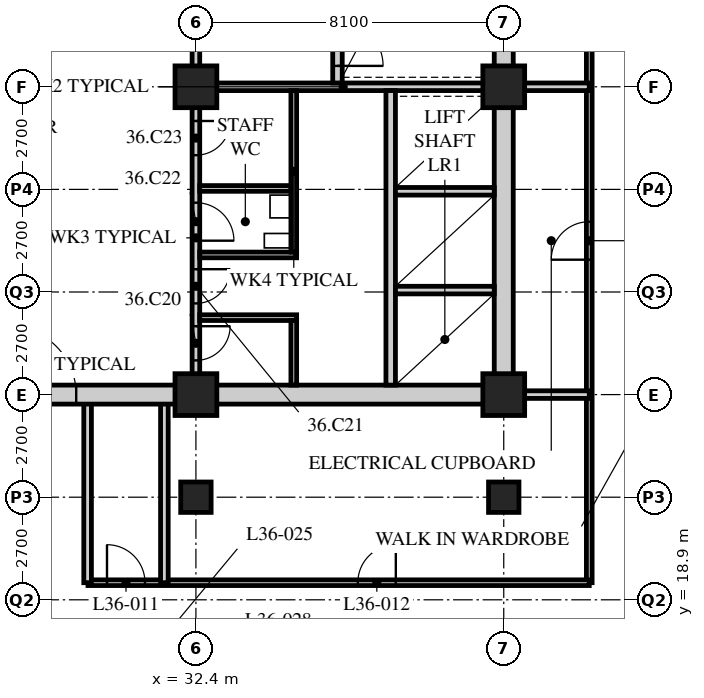
"""IFC4 building model, lengths in metres.
Left out: names, types, materials, properties, quantities, classifications, styles, units other than length and angle.
Written with IfcOpenShell. Run it as: python <this file> out.ifc"""

import sys

from ifc_helpers import new_model, si_unit, direction, frame, frame_2d, origin, origin_2d, place, context, subcontext, project, spatial, rectangle, hollow_rectangle, extrude, element, fill, save


model = new_model("IFC4")
c1 = context("Model", 3, precision=1e-05, world=origin(), true_north=direction((0.0, 1.0)))
c2 = subcontext(c1, "Body", "Model", "MODEL_VIEW")
j1 = project(units=[si_unit("LENGTHUNIT", "METRE"), si_unit("PLANEANGLEUNIT", "RADIAN")], contexts=[c1])
p1 = place(None, origin())
s1 = spatial("IfcSite", under=j1, at=p1, CompositionType="ELEMENT")
p2 = place(p1, origin())
s2 = spatial("IfcBuilding", under=s1, at=p2, CompositionType="ELEMENT")
p3 = place(p2, frame((0.0, 0.0, 140.8)))
s3 = spatial("IfcBuildingStorey", under=s2, at=p3, CompositionType="ELEMENT", Elevation=140.8)
p4 = place(p3, frame((32.4, 21.6, 0.0), z_axis=(0.0, 0.0, 1.0), x_axis=(1.0, 0.0, 0.0)))
e1 = element("IfcColumn", 1, at=p4, inside=s3, PredefinedType="COLUMN", context=c2, shape_type="SweptSolid", body=[
    extrude(hollow_rectangle(XDim=0.8, YDim=0.8, WallThickness=0.08, at=origin_2d()), origin(), (0.0, 0.0, 1.0), 3.4),
])
for number, where, z_axis, x_axis in (
    (2, (32.4, 24.3, 0.0), (0.0, 0.0, 1.0), (1.0, 0.0, 0.0)),
    (3, (32.4, 32.4, 0.0), (0.0, 0.0, 1.0), (1.0, 0.0, 0.0)),
):
    element("IfcColumn", number, at=place(p3, frame(where, z_axis=z_axis, x_axis=x_axis)), inside=s3, PredefinedType="COLUMN", context=c2, shape_type="SweptSolid", body=[
        extrude(hollow_rectangle(XDim=1.1, YDim=1.1, WallThickness=0.1, at=origin_2d()), origin(), (0.0, 0.0, 1.0), 3.4),
    ])
p5 = place(p3, frame((40.5, 21.6, 0.0), z_axis=(0.0, 0.0, 1.0), x_axis=(1.0, 0.0, 0.0)))
e4 = element("IfcColumn", 4, at=p5, inside=s3, PredefinedType="COLUMN", context=c2, shape_type="SweptSolid", body=[
    extrude(hollow_rectangle(XDim=0.8, YDim=0.8, WallThickness=0.08, at=origin_2d()), origin(), (0.0, 0.0, 1.0), 3.4),
])
for number, where, z_axis, x_axis in (
    (5, (40.5, 24.3, 0.0), (0.0, 0.0, 1.0), (1.0, 0.0, 0.0)),
    (6, (40.5, 32.4, 0.0), (0.0, 0.0, 1.0), (1.0, 0.0, 0.0)),
):
    element("IfcColumn", number, at=place(p3, frame(where, z_axis=z_axis, x_axis=x_axis)), inside=s3, PredefinedType="COLUMN", context=c2, shape_type="SweptSolid", body=[
        extrude(hollow_rectangle(XDim=1.1, YDim=1.1, WallThickness=0.1, at=origin_2d()), origin(), (0.0, 0.0, 1.0), 3.4),
    ])
p6 = place(p3, frame((42.75, 19.35, 0.0), z_axis=(0.0, 0.0, 1.0), x_axis=(0.0, 1.0, 0.0)))
e7 = element("IfcWall", 7, at=p6, inside=s3, PredefinedType="PARTITIONING", context=c2, shape_type="SweptSolid", body=[
    extrude(rectangle(XDim=24.75, YDim=0.15, at=frame_2d((12.375, 0.0))), origin(), (0.0, 0.0, 1.0), 3.19),
])
p7 = place(p6, frame((8.5, 0.0, 0.0)))
e8 = element("IfcOpeningElement", 8, at=p7, cuts=e7, PredefinedType="OPENING", context=c2, shape_type="SweptSolid", body=[
    extrude(rectangle(XDim=1.0, YDim=2.1, at=frame_2d((0.5, 1.05))), frame((0.0, 0.085, 0.0), z_axis=(0.0, -1.0, 0.0), x_axis=(1.0, 0.0, 0.0)), (0.0, 0.0, 1.0), 0.17),
])
p8 = place(p6, frame((16.6, 0.0, 0.0)))
e9 = element("IfcOpeningElement", 9, at=p8, cuts=e7, PredefinedType="OPENING", context=c2, shape_type="SweptSolid", body=[
    extrude(rectangle(XDim=1.0, YDim=2.1, at=frame_2d((0.5, 1.05))), frame((0.0, 0.085, 0.0), z_axis=(0.0, -1.0, 0.0), x_axis=(1.0, 0.0, 0.0)), (0.0, 0.0, 1.0), 0.17),
])
p9 = place(p3, frame((29.56, 19.35, 0.0), z_axis=(0.0, 0.0, 1.0), x_axis=(1.0, 0.0, 0.0)))
e10 = element("IfcWall", 10, at=p9, inside=s3, PredefinedType="PARTITIONING", context=c2, shape_type="SweptSolid", body=[
    extrude(rectangle(XDim=13.19, YDim=0.15, at=frame_2d((6.595, 0.0))), origin(), (0.0, 0.0, 1.0), 3.19),
])
p10 = place(p9, frame((0.5, 0.0, 0.0)))
e11 = element("IfcOpeningElement", 11, at=p10, cuts=e10, PredefinedType="OPENING", context=c2, shape_type="SweptSolid", body=[
    extrude(rectangle(XDim=1.0, YDim=2.1, at=frame_2d((0.5, 1.05))), frame((0.0, 0.085, 0.0), z_axis=(0.0, -1.0, 0.0), x_axis=(1.0, 0.0, 0.0)), (0.0, 0.0, 1.0), 0.17),
])
p11 = place(p9, frame((7.1, 0.0, 0.0)))
e12 = element("IfcOpeningElement", 12, at=p11, cuts=e10, PredefinedType="OPENING", context=c2, shape_type="SweptSolid", body=[
    extrude(rectangle(XDim=1.0, YDim=2.1, at=frame_2d((0.5, 1.05))), frame((0.0, 0.085, 0.0), z_axis=(0.0, -1.0, 0.0), x_axis=(1.0, 0.0, 0.0)), (0.0, 0.0, 1.0), 0.17),
])
p12 = place(p3, frame((40.5, 32.4, 0.0), z_axis=(0.0, 0.0, 1.0), x_axis=(1.0, 0.0, 0.0)))
e13 = element("IfcWall", 13, at=p12, inside=s3, PredefinedType="SOLIDWALL", context=c2, shape_type="SweptSolid", body=[
    extrude(rectangle(XDim=2.25, YDim=0.2, at=frame_2d((1.125, 0.0))), origin(), (0.0, 0.0, 1.0), 3.19),
])
for number, where, z_axis, x_axis in (
    (14, (31.57, 19.35, 0.0), (0.0, 0.0, 1.0), (0.0, 1.0, 0.0)),
    (15, (29.55, 19.35, 0.0), (0.0, 0.0, 1.0), (0.0, 1.0, 0.0)),
):
    element("IfcWall", number, at=place(p3, frame(where, z_axis=z_axis, x_axis=x_axis)), inside=s3, PredefinedType="SOLIDWALL", context=c2, shape_type="SweptSolid", body=[
        extrude(rectangle(XDim=4.95, YDim=0.2, at=frame_2d((2.475, 0.0))), origin(), (0.0, 0.0, 1.0), 3.19),
    ])
p13 = place(p3, frame((40.5, 24.3, 0.0), z_axis=(0.0, 0.0, 1.0), x_axis=(1.0, 0.0, 0.0)))
e16 = element("IfcWall", 16, at=p13, inside=s3, PredefinedType="SOLIDWALL", context=c2, shape_type="SweptSolid", body=[
    extrude(rectangle(XDim=2.25, YDim=0.2, at=frame_2d((1.125, 0.0))), origin(), (0.0, 0.0, 1.0), 3.19),
])
p14 = place(p3, frame((15.95, 24.3, 0.0), z_axis=(0.0, 0.0, 1.0), x_axis=(1.0, 0.0, 0.0)))
e17 = element("IfcWall", 17, at=p14, inside=s3, PredefinedType="SOLIDWALL", context=c2, shape_type="SweptSolid", body=[
    extrude(rectangle(XDim=24.8, YDim=0.5, at=frame_2d((12.4, 0.0))), origin(), (0.0, 0.0, 1.0), 2.54),
])
p15 = place(p14, frame((11.5, 0.0, 0.0)))
e18 = element("IfcOpeningElement", 18, at=p15, cuts=e17, PredefinedType="OPENING", context=c2, shape_type="SweptSolid", body=[
    extrude(rectangle(XDim=1.8, YDim=2.4, at=frame_2d((0.9, 1.2))), frame((0.0, 0.26, 0.0), z_axis=(0.0, -1.0, 0.0), x_axis=(1.0, 0.0, 0.0)), (0.0, 0.0, 1.0), 0.52),
])
p16 = place(p3, frame((40.5, 24.55, 0.0), z_axis=(0.0, 0.0, 1.0), x_axis=(0.0, 1.0, 0.0)))
e19 = element("IfcWall", 19, at=p16, inside=s3, PredefinedType="SOLIDWALL", context=c2, shape_type="SweptSolid", body=[
    extrude(rectangle(XDim=15.7, YDim=0.5, at=frame_2d((7.85, 0.0))), origin(), (0.0, 0.0, 1.0), 2.578),
])
p17 = place(p3, frame((32.3, 32.4, 0.0), z_axis=(0.0, 0.0, 1.0), x_axis=(1.0, 0.0, 0.0)))
e20 = element("IfcWall", 20, at=p17, inside=s3, PredefinedType="SOLIDWALL", context=c2, shape_type="SweptSolid", body=[
    extrude(rectangle(XDim=7.95, YDim=0.2, at=frame_2d((3.975, 0.0))), origin(), (0.0, 0.0, 1.0), 2.578),
])
p18 = place(p3, frame((32.4, 32.5, 0.0), z_axis=(0.0, 0.0, 1.0), x_axis=(0.0, 1.0, 0.0)))
e21 = element("IfcWall", 21, at=p18, inside=s3, PredefinedType="SOLIDWALL", context=c2, shape_type="SweptSolid", body=[
    extrude(rectangle(XDim=7.75, YDim=0.2, at=frame_2d((3.875, 0.0))), origin(), (0.0, 0.0, 1.0), 2.578),
])
p19 = place(p18, frame((1.9, 0.0, 0.0)))
e22 = element("IfcOpeningElement", 22, at=p19, cuts=e21, PredefinedType="OPENING", context=c2, shape_type="SweptSolid", body=[
    extrude(rectangle(XDim=1.2, YDim=2.1, at=frame_2d((0.6, 1.05))), frame((0.0, 0.11, 0.0), z_axis=(0.0, -1.0, 0.0), x_axis=(1.0, 0.0, 0.0)), (0.0, 0.0, 1.0), 0.22),
])
p20 = place(p3, frame((37.525, 24.55, 0.0), z_axis=(0.0, 0.0, 1.0), x_axis=(0.0, 1.0, 0.0)))
e23 = element("IfcWall", 23, at=p20, inside=s3, PredefinedType="SOLIDWALL", context=c2, shape_type="SweptSolid", body=[
    extrude(rectangle(XDim=7.75, YDim=0.25, at=frame_2d((3.875, 0.0))), origin(), (0.0, 0.0, 1.0), 3.19),
])
for number, where, z_axis, x_axis in (
    (24, (37.65, 27.05, 0.0), (0.0, 0.0, 1.0), (1.0, 0.0, 0.0)),
    (25, (37.65, 29.65, 0.0), (0.0, 0.0, 1.0), (1.0, 0.0, 0.0)),
):
    element("IfcWall", number, at=place(p3, frame(where, z_axis=z_axis, x_axis=x_axis)), inside=s3, PredefinedType="SOLIDWALL", context=c2, shape_type="SweptSolid", body=[
        extrude(rectangle(XDim=2.6, YDim=0.2, at=frame_2d((1.3, 0.0))), origin(), (0.0, 0.0, 1.0), 3.19),
    ])
p21 = place(p3, frame((36.125, 32.5, 0.0), z_axis=(0.0, 0.0, 1.0), x_axis=(0.0, 1.0, 0.0)))
e26 = element("IfcWall", 26, at=p21, inside=s3, PredefinedType="SOLIDWALL", context=c2, shape_type="SweptSolid", body=[
    extrude(rectangle(XDim=7.75, YDim=0.25, at=frame_2d((3.875, 0.0))), origin(), (0.0, 0.0, 1.0), 3.19),
])
p22 = place(p21, frame((0.45, 0.0, 0.0)))
e27 = element("IfcOpeningElement", 27, at=p22, cuts=e26, PredefinedType="OPENING", context=c2, shape_type="SweptSolid", body=[
    extrude(rectangle(XDim=1.2, YDim=2.1, at=frame_2d((0.6, 1.05))), frame((0.0, 0.135, 0.0), z_axis=(0.0, -1.0, 0.0), x_axis=(1.0, 0.0, 0.0)), (0.0, 0.0, 1.0), 0.27),
])
p23 = place(p3, frame((32.4, 24.55, 0.0), z_axis=(0.0, 0.0, 1.0), x_axis=(0.0, 1.0, 0.0)))
e28 = element("IfcWall", 28, at=p23, inside=s3, PredefinedType="PARTITIONING", context=c2, shape_type="SweptSolid", body=[
    extrude(rectangle(XDim=7.75, YDim=0.2, at=frame_2d((3.875, 0.0))), origin(), (0.0, 0.0, 1.0), 2.578),
])
p24 = place(p23, frame((0.65, 0.0, 0.0)))
e29 = element("IfcOpeningElement", 29, at=p24, cuts=e28, PredefinedType="OPENING", context=c2, shape_type="SweptSolid", body=[
    extrude(rectangle(XDim=0.9, YDim=2.1, at=frame_2d((0.45, 1.05))), frame((0.0, 0.11, 0.0), z_axis=(0.0, -1.0, 0.0), x_axis=(1.0, 0.0, 0.0)), (0.0, 0.0, 1.0), 0.22),
])
p25 = place(p23, frame((2.15, 0.0, 0.0)))
e30 = element("IfcOpeningElement", 30, at=p25, cuts=e28, PredefinedType="OPENING", context=c2, shape_type="SweptSolid", body=[
    extrude(rectangle(XDim=0.9, YDim=2.1, at=frame_2d((0.45, 1.05))), frame((0.0, 0.11, 0.0), z_axis=(0.0, -1.0, 0.0), x_axis=(1.0, 0.0, 0.0)), (0.0, 0.0, 1.0), 0.22),
])
p26 = place(p23, frame((3.8, 0.0, 0.0)))
e31 = element("IfcOpeningElement", 31, at=p26, cuts=e28, PredefinedType="OPENING", context=c2, shape_type="SweptSolid", body=[
    extrude(rectangle(XDim=1.0, YDim=2.1, at=frame_2d((0.5, 1.05))), frame((0.0, 0.11, 0.0), z_axis=(0.0, -1.0, 0.0), x_axis=(1.0, 0.0, 0.0)), (0.0, 0.0, 1.0), 0.22),
])
p27 = place(p23, frame((6.05, 0.0, 0.0)))
e32 = element("IfcOpeningElement", 32, at=p27, cuts=e28, PredefinedType="OPENING", context=c2, shape_type="SweptSolid", body=[
    extrude(rectangle(XDim=0.9, YDim=2.1, at=frame_2d((0.45, 1.05))), frame((0.0, 0.11, 0.0), z_axis=(0.0, -1.0, 0.0), x_axis=(1.0, 0.0, 0.0)), (0.0, 0.0, 1.0), 0.22),
])
for number, where, z_axis, x_axis in (
    (33, (32.5, 26.325, 0.0), (0.0, 0.0, 1.0), (1.0, 0.0, 0.0)),
    (34, (32.5, 27.975, 0.0), (0.0, 0.0, 1.0), (1.0, 0.0, 0.0)),
):
    element("IfcWall", number, at=place(p3, frame(where, z_axis=z_axis, x_axis=x_axis)), inside=s3, PredefinedType="PARTITIONING", context=c2, shape_type="SweptSolid", body=[
        extrude(rectangle(XDim=2.55, YDim=0.15, at=frame_2d((1.275, 0.0))), origin(), (0.0, 0.0, 1.0), 3.19),
    ])
p28 = place(p3, frame((32.5, 29.725, 0.0), z_axis=(0.0, 0.0, 1.0), x_axis=(1.0, 0.0, 0.0)))
e35 = element("IfcWall", 35, at=p28, inside=s3, PredefinedType="PARTITIONING", context=c2, shape_type="SweptSolid", body=[
    extrude(rectangle(XDim=2.4, YDim=0.15, at=frame_2d((1.2, 0.0))), origin(), (0.0, 0.0, 1.0), 3.19),
])
p29 = place(p3, frame((34.975, 24.55, 0.0), z_axis=(0.0, 0.0, 1.0), x_axis=(0.0, 1.0, 0.0)))
e36 = element("IfcWall", 36, at=p29, inside=s3, PredefinedType="PARTITIONING", context=c2, shape_type="SweptSolid", body=[
    extrude(rectangle(XDim=1.7, YDim=0.15, at=frame_2d((0.85, 0.0))), origin(), (0.0, 0.0, 1.0), 3.19),
])
p30 = place(p3, frame((34.975, 28.05, 0.0), z_axis=(0.0, 0.0, 1.0), x_axis=(0.0, 1.0, 0.0)))
e37 = element("IfcWall", 37, at=p30, inside=s3, PredefinedType="PARTITIONING", context=c2, shape_type="SweptSolid", body=[
    extrude(rectangle(XDim=4.25, YDim=0.15, at=frame_2d((2.125, 0.0))), origin(), (0.0, 0.0, 1.0), 3.19),
])
p31 = place(p7, origin())
e38 = element("IfcDoor", 38, at=p31, inside=s3, OperationType="SINGLE_SWING_LEFT", PredefinedType="DOOR", context=c2, shape_type="SweptSolid", body=[
    extrude(rectangle(XDim=1.0, YDim=2.1, at=frame_2d((0.5, 1.05))), frame((0.0, 0.025, 0.0), z_axis=(0.0, -1.0, 0.0), x_axis=(1.0, 0.0, 0.0)), (0.0, 0.0, 1.0), 0.05),
])
fill(e8, e38)
p32 = place(p10, origin())
e39 = element("IfcDoor", 39, at=p32, inside=s3, OperationType="SINGLE_SWING_LEFT", PredefinedType="DOOR", context=c2, shape_type="SweptSolid", body=[
    extrude(rectangle(XDim=1.0, YDim=2.1, at=frame_2d((0.5, 1.05))), frame((0.0, 0.025, 0.0), z_axis=(0.0, -1.0, 0.0), x_axis=(1.0, 0.0, 0.0)), (0.0, 0.0, 1.0), 0.05),
])
fill(e11, e39)
p33 = place(p11, origin())
e40 = element("IfcDoor", 40, at=p33, inside=s3, OperationType="SINGLE_SWING_RIGHT", PredefinedType="DOOR", context=c2, shape_type="SweptSolid", body=[
    extrude(rectangle(XDim=1.0, YDim=2.1, at=frame_2d((0.5, 1.05))), frame((0.0, 0.025, 0.0), z_axis=(0.0, -1.0, 0.0), x_axis=(1.0, 0.0, 0.0)), (0.0, 0.0, 1.0), 0.05),
])
fill(e12, e40)
p34 = place(p24, origin())
e41 = element("IfcDoor", 41, at=p34, inside=s3, OperationType="SINGLE_SWING_LEFT", PredefinedType="DOOR", context=c2, shape_type="SweptSolid", body=[
    extrude(rectangle(XDim=0.9, YDim=2.1, at=frame_2d((0.45, 1.05))), frame((0.0, 0.025, 0.0), z_axis=(0.0, -1.0, 0.0), x_axis=(1.0, 0.0, 0.0)), (0.0, 0.0, 1.0), 0.05),
])
fill(e29, e41)
p35 = place(p25, origin())
e42 = element("IfcDoor", 42, at=p35, inside=s3, OperationType="SINGLE_SWING_LEFT", PredefinedType="DOOR", context=c2, shape_type="SweptSolid", body=[
    extrude(rectangle(XDim=0.9, YDim=2.1, at=frame_2d((0.45, 1.05))), frame((0.0, 0.025, 0.0), z_axis=(0.0, -1.0, 0.0), x_axis=(1.0, 0.0, 0.0)), (0.0, 0.0, 1.0), 0.05),
])
fill(e30, e42)
p36 = place(p26, origin())
e43 = element("IfcDoor", 43, at=p36, inside=s3, OperationType="SINGLE_SWING_RIGHT", PredefinedType="DOOR", context=c2, shape_type="SweptSolid", body=[
    extrude(rectangle(XDim=1.0, YDim=2.1, at=frame_2d((0.5, 1.05))), frame((0.0, 0.025, 0.0), z_axis=(0.0, -1.0, 0.0), x_axis=(1.0, 0.0, 0.0)), (0.0, 0.0, 1.0), 0.05),
])
fill(e31, e43)
p37 = place(p27, origin())
e44 = element("IfcDoor", 44, at=p37, inside=s3, OperationType="SINGLE_SWING_LEFT", PredefinedType="DOOR", context=c2, shape_type="SweptSolid", body=[
    extrude(rectangle(XDim=0.9, YDim=2.1, at=frame_2d((0.45, 1.05))), frame((0.0, 0.025, 0.0), z_axis=(0.0, -1.0, 0.0), x_axis=(1.0, 0.0, 0.0)), (0.0, 0.0, 1.0), 0.05),
])
fill(e32, e44)
p38 = place(p22, origin())
e45 = element("IfcDoor", 45, at=p38, inside=s3, OperationType="SINGLE_SWING_RIGHT", PredefinedType="DOOR", context=c2, shape_type="SweptSolid", body=[
    extrude(rectangle(XDim=1.2, YDim=2.1, at=frame_2d((0.6, 1.05))), frame((0.0, 0.025, 0.0), z_axis=(0.0, -1.0, 0.0), x_axis=(1.0, 0.0, 0.0)), (0.0, 0.0, 1.0), 0.05),
])
fill(e27, e45)
p39 = place(p15, origin())
e46 = element("IfcDoor", 46, at=p39, inside=s3, OperationType="DOUBLE_DOOR_SINGLE_SWING", PredefinedType="DOOR", context=c2, shape_type="SweptSolid", body=[
    extrude(rectangle(XDim=1.8, YDim=2.4, at=frame_2d((0.9, 1.2))), frame((0.0, 0.025, 0.0), z_axis=(0.0, -1.0, 0.0), x_axis=(1.0, 0.0, 0.0)), (0.0, 0.0, 1.0), 0.05),
])
fill(e18, e46)
save(model, sys.argv[1])
